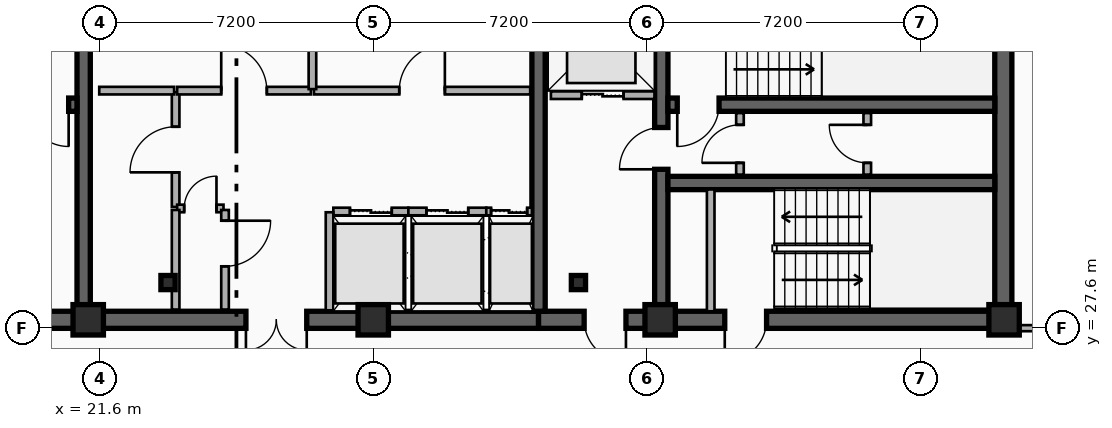
"""IFC4 building model, lengths in metres.
Left out: names, types, materials, properties, quantities, classifications, styles, units other than length and angle.
Written with IfcOpenShell. Run it as: python <this file> out.ifc"""

import sys

from ifc_helpers import new_model, si_unit, direction, frame, frame_2d, origin, origin_2d, place, context, subcontext, project, spatial, rectangle, i_section, extrude, element, fill, save


model = new_model("IFC4")
c1 = context("Model", 3, precision=1e-05, world=origin(), true_north=direction((0.0, 1.0)))
c2 = subcontext(c1, "Body", "Model", "MODEL_VIEW")
j1 = project(units=[si_unit("LENGTHUNIT", "METRE"), si_unit("PLANEANGLEUNIT", "RADIAN")], contexts=[c1])
p1 = place(None, origin())
s1 = spatial("IfcSite", under=j1, at=p1, CompositionType="ELEMENT")
p2 = place(p1, origin())
s2 = spatial("IfcBuilding", under=s1, at=p2, CompositionType="ELEMENT")
p3 = place(p2, frame((0.0, 0.0, 273.2)))
s3 = spatial("IfcBuildingStorey", under=s2, at=p3, CompositionType="ELEMENT", Elevation=273.2)
p4 = place(p3, frame((21.18, 27.82, 0.0), z_axis=(0.0, 0.0, 1.0), x_axis=(-1.0, 0.0, 0.0)))
e1 = element("IfcWall", 1, at=p4, inside=s3, PredefinedType="SHEAR", context=c2, shape_type="SweptSolid", body=[
    extrude(rectangle(XDim=9.03, YDim=0.45, at=frame_2d((4.515, 0.0))), origin(), (0.0, 0.0, 1.0), 3.7),
])
p5 = place(p4, frame((2.68, 0.0, 0.0)))
e2 = element("IfcOpeningElement", 2, at=p5, cuts=e1, PredefinedType="OPENING", context=c2, shape_type="SweptSolid", body=[
    extrude(rectangle(XDim=1.1, YDim=2.15, at=frame_2d((0.55, 1.075))), frame((0.0, 0.235, 0.0), z_axis=(0.0, -1.0, 0.0), x_axis=(1.0, 0.0, 0.0)), (0.0, 0.0, 1.0), 0.47),
])
p6 = place(p3, frame((33.15, 27.82, 0.0), z_axis=(0.0, 0.0, 1.0), x_axis=(-1.0, 0.0, 0.0)))
e3 = element("IfcWall", 3, at=p6, inside=s3, PredefinedType="SHEAR", context=c2, shape_type="SweptSolid", body=[
    extrude(rectangle(XDim=11.97, YDim=0.45, at=frame_2d((5.985, 0.0))), origin(), (0.0, 0.0, 1.0), 3.7),
])
p7 = place(p6, frame((6.1, 0.0, 0.0)))
e4 = element("IfcOpeningElement", 4, at=p7, cuts=e3, PredefinedType="OPENING", context=c2, shape_type="SweptSolid", body=[
    extrude(rectangle(XDim=1.6, YDim=2.2, at=frame_2d((0.8, 1.1))), frame((0.0, 0.235, 0.0), z_axis=(0.0, -1.0, 0.0), x_axis=(1.0, 0.0, 0.0)), (0.0, 0.0, 1.0), 0.47),
])
p8 = place(p3, frame((45.38, 27.82, 0.0), z_axis=(0.0, 0.0, 1.0), x_axis=(-1.0, 0.0, 0.0)))
e5 = element("IfcWall", 5, at=p8, inside=s3, PredefinedType="SHEAR", context=c2, shape_type="SweptSolid", body=[
    extrude(rectangle(XDim=12.23, YDim=0.45, at=frame_2d((6.115, 0.0))), origin(), (0.0, 0.0, 1.0), 3.7),
])
p9 = place(p8, frame((9.93, 0.0, 0.0)))
e6 = element("IfcOpeningElement", 6, at=p9, cuts=e5, PredefinedType="OPENING", context=c2, shape_type="SweptSolid", body=[
    extrude(rectangle(XDim=1.1, YDim=2.15, at=frame_2d((0.55, 1.075))), frame((0.0, 0.235, 0.0), z_axis=(0.0, -1.0, 0.0), x_axis=(1.0, 0.0, 0.0)), (0.0, 0.0, 1.0), 0.47),
])
p10 = place(p8, frame((6.23, 0.0, 0.0)))
e7 = element("IfcOpeningElement", 7, at=p10, cuts=e5, PredefinedType="OPENING", context=c2, shape_type="SweptSolid", body=[
    extrude(rectangle(XDim=1.1, YDim=2.15, at=frame_2d((0.55, 1.075))), frame((0.0, 0.235, 0.0), z_axis=(0.0, -1.0, 0.0), x_axis=(1.0, 0.0, 0.0)), (0.0, 0.0, 1.0), 0.47),
])
p11 = place(p3, frame((45.38, 28.045, 0.0), z_axis=(0.0, 0.0, 1.0), x_axis=(0.0, 1.0, 0.0)))
e8 = element("IfcWall", 8, at=p11, inside=s3, PredefinedType="SHEAR", context=c2, shape_type="SweptSolid", body=[
    extrude(rectangle(XDim=8.78, YDim=0.45, at=frame_2d((4.39, 0.0))), origin(), (0.0, 0.0, 1.0), 3.7),
])
for number, where, z_axis, x_axis in (
    (9, (21.18, 28.045, 0.0), (0.0, 0.0, 1.0), (0.0, 1.0, 0.0)),
    (10, (33.15, 28.045, 0.0), (0.0, 0.0, 1.0), (0.0, 1.0, 0.0)),
):
    element("IfcWall", number, at=place(p3, frame(where, z_axis=z_axis, x_axis=x_axis)), inside=s3, PredefinedType="SHEAR", context=c2, shape_type="SweptSolid", body=[
        extrude(rectangle(XDim=8.78, YDim=0.35, at=frame_2d((4.39, 0.0))), origin(), (0.0, 0.0, 1.0), 3.7),
    ])
p12 = place(p3, frame((36.38, 28.045, 0.0), z_axis=(0.0, 0.0, 1.0), x_axis=(0.0, 1.0, 0.0)))
e11 = element("IfcWall", 11, at=p12, inside=s3, PredefinedType="SHEAR", context=c2, shape_type="SweptSolid", body=[
    extrude(rectangle(XDim=8.78, YDim=0.35, at=frame_2d((4.39, 0.0))), origin(), (0.0, 0.0, 1.0), 3.7),
])
p13 = place(p12, frame((3.735, 0.0, 0.0)))
e12 = element("IfcOpeningElement", 12, at=p13, cuts=e11, PredefinedType="OPENING", context=c2, shape_type="SweptSolid", body=[
    extrude(rectangle(XDim=1.1, YDim=2.15, at=frame_2d((0.55, 1.075))), frame((0.0, 0.185, 0.0), z_axis=(0.0, -1.0, 0.0), x_axis=(1.0, 0.0, 0.0)), (0.0, 0.0, 1.0), 0.37),
])
p14 = place(p3, frame((21.005, 33.48, 0.0), z_axis=(0.0, 0.0, 1.0), x_axis=(-1.0, 0.0, 0.0)))
e13 = element("IfcWall", 13, at=p14, inside=s3, PredefinedType="SHEAR", context=c2, shape_type="SweptSolid", body=[
    extrude(rectangle(XDim=8.63, YDim=0.35, at=frame_2d((4.315, 0.0))), origin(), (0.0, 0.0, 1.0), 3.7),
])
p15 = place(p14, frame((0.22, 0.0, 0.0)))
e14 = element("IfcOpeningElement", 14, at=p15, cuts=e13, PredefinedType="OPENING", context=c2, shape_type="SweptSolid", body=[
    extrude(rectangle(XDim=1.1, YDim=2.15, at=frame_2d((0.55, 1.075))), frame((0.0, 0.185, 0.0), z_axis=(0.0, -1.0, 0.0), x_axis=(1.0, 0.0, 0.0)), (0.0, 0.0, 1.0), 0.37),
])
p16 = place(p3, frame((45.155, 33.48, 0.0), z_axis=(0.0, 0.0, 1.0), x_axis=(-1.0, 0.0, 0.0)))
e15 = element("IfcWall", 15, at=p16, inside=s3, PredefinedType="SHEAR", context=c2, shape_type="SweptSolid", body=[
    extrude(rectangle(XDim=8.6, YDim=0.35, at=frame_2d((4.3, 0.0))), origin(), (0.0, 0.0, 1.0), 3.7),
])
p17 = place(p16, frame((7.255, 0.0, 0.0)))
e16 = element("IfcOpeningElement", 16, at=p17, cuts=e15, PredefinedType="OPENING", context=c2, shape_type="SweptSolid", body=[
    extrude(rectangle(XDim=1.1, YDim=2.15, at=frame_2d((0.55, 1.075))), frame((0.0, 0.185, 0.0), z_axis=(0.0, -1.0, 0.0), x_axis=(1.0, 0.0, 0.0)), (0.0, 0.0, 1.0), 0.37),
])
p18 = place(p3, frame((36.555, 31.42, 0.0), z_axis=(0.0, 0.0, 1.0), x_axis=(1.0, 0.0, 0.0)))
e17 = element("IfcWall", 17, at=p18, inside=s3, PredefinedType="SHEAR", context=c2, shape_type="SweptSolid", body=[
    extrude(rectangle(XDim=8.6, YDim=0.35, at=frame_2d((4.3, 0.0))), origin(), (0.0, 0.0, 1.0), 3.7),
])
for number, where, z_axis, x_axis in (
    (18, (23.4, 28.8, 0.0), (0.0, 0.0, 1.0), (1.0, 0.0, 0.0)),
    (19, (34.2, 28.8, 0.0), (0.0, 0.0, 1.0), (1.0, 0.0, 0.0)),
):
    element("IfcColumn", number, at=place(p3, frame(where, z_axis=z_axis, x_axis=x_axis)), inside=s3, PredefinedType="COLUMN", context=c2, shape_type="SweptSolid", body=[
        extrude(i_section(OverallWidth=0.374, OverallDepth=0.372, WebThickness=0.017, FlangeThickness=0.027, FilletRadius=0.015, at=origin_2d()), origin(), (0.0, 0.0, 1.0), 3.7),
    ])
for number, where, z_axis, x_axis in (
    (20, (21.3, 27.82, 0.0), (0.0, 0.0, 1.0), (1.0, 0.0, 0.0)),
    (21, (28.8, 27.82, 0.0), (0.0, 0.0, 1.0), (1.0, 0.0, 0.0)),
    (22, (36.35, 27.82, 0.0), (0.0, 0.0, 1.0), (1.0, 0.0, 0.0)),
    (23, (45.4, 27.82, 0.0), (0.0, 0.0, 1.0), (1.0, 0.0, 0.0)),
):
    element("IfcColumn", number, at=place(p3, frame(where, z_axis=z_axis, x_axis=x_axis)), inside=s3, PredefinedType="COLUMN", context=c2, shape_type="SweptSolid", body=[
        extrude(rectangle(XDim=0.8, YDim=0.8, at=origin_2d()), origin(), (0.0, 0.0, 1.0), 3.7),
    ])
p19 = place(p3, frame((33.475, 33.73, 0.0), z_axis=(0.0, 0.0, 1.0), x_axis=(1.0, 0.0, 0.0)))
e24 = element("IfcWall", 24, at=p19, inside=s3, PredefinedType="PARTITIONING", context=c2, shape_type="SweptSolid", body=[
    extrude(rectangle(XDim=2.725, YDim=0.2, at=frame_2d((1.362, 0.0))), origin(), (0.0, 0.0, 1.0), 2.49),
])
p20 = place(p19, frame((0.812, 0.0, 0.0)))
e25 = element("IfcOpeningElement", 25, at=p20, cuts=e24, PredefinedType="OPENING", context=c2, shape_type="SweptSolid", body=[
    extrude(rectangle(XDim=1.1, YDim=2.15, at=frame_2d((0.55, 1.075))), frame((0.0, 0.11, 0.0), z_axis=(0.0, -1.0, 0.0), x_axis=(1.0, 0.0, 0.0)), (0.0, 0.0, 1.0), 0.22),
])
p21 = place(p3, frame((27.75, 30.67, 0.0), z_axis=(0.0, 0.0, 1.0), x_axis=(1.0, 0.0, 0.0)))
e26 = element("IfcWall", 26, at=p21, inside=s3, PredefinedType="PARTITIONING", context=c2, shape_type="SweptSolid", body=[
    extrude(rectangle(XDim=1.975, YDim=0.2, at=frame_2d((0.988, 0.0))), origin(), (0.0, 0.0, 1.0), 2.49),
])
p22 = place(p21, frame((0.438, 0.0, 0.0)))
e27 = element("IfcOpeningElement", 27, at=p22, cuts=e26, PredefinedType="OPENING", context=c2, shape_type="SweptSolid", body=[
    extrude(rectangle(XDim=1.1, YDim=2.15, at=frame_2d((0.55, 1.075))), frame((0.0, 0.11, 0.0), z_axis=(0.0, -1.0, 0.0), x_axis=(1.0, 0.0, 0.0)), (0.0, 0.0, 1.0), 0.22),
])
p23 = place(p3, frame((27.65, 28.07, 0.0), z_axis=(0.0, 0.0, 1.0), x_axis=(0.0, 1.0, 0.0)))
e28 = element("IfcWall", 28, at=p23, inside=s3, PredefinedType="PARTITIONING", context=c2, shape_type="SweptSolid", body=[
    extrude(rectangle(XDim=2.58, YDim=0.2, at=frame_2d((1.29, 0.0))), origin(), (0.0, 0.0, 1.0), 2.49),
])
p24 = place(p3, frame((29.725, 30.67, 0.0), z_axis=(0.0, 0.0, 1.0), x_axis=(1.0, 0.0, 0.0)))
e29 = element("IfcWall", 29, at=p24, inside=s3, PredefinedType="PARTITIONING", context=c2, shape_type="SweptSolid", body=[
    extrude(rectangle(XDim=2.05, YDim=0.2, at=frame_2d((1.025, 0.0))), origin(), (0.0, 0.0, 1.0), 2.8),
])
p25 = place(p24, frame((0.475, 0.0, 0.0)))
e30 = element("IfcOpeningElement", 30, at=p25, cuts=e29, PredefinedType="OPENING", context=c2, shape_type="SweptSolid", body=[
    extrude(rectangle(XDim=1.1, YDim=2.15, at=frame_2d((0.55, 1.075))), frame((0.0, 0.11, 0.0), z_axis=(0.0, -1.0, 0.0), x_axis=(1.0, 0.0, 0.0)), (0.0, 0.0, 1.0), 0.22),
])
p26 = place(p3, frame((31.775, 30.67, 0.0), z_axis=(0.0, 0.0, 1.0), x_axis=(1.0, 0.0, 0.0)))
e31 = element("IfcWall", 31, at=p26, inside=s3, PredefinedType="PARTITIONING", context=c2, shape_type="SweptSolid", body=[
    extrude(rectangle(XDim=1.2, YDim=0.2, at=frame_2d((0.6, 0.0))), origin(), (0.0, 0.0, 1.0), 2.8),
])
p27 = place(p26, frame((0.125, 0.0, 0.0)))
e32 = element("IfcOpeningElement", 32, at=p27, cuts=e31, PredefinedType="OPENING", context=c2, shape_type="SweptSolid", body=[
    extrude(rectangle(XDim=0.95, YDim=2.15, at=frame_2d((0.475, 1.075))), frame((0.0, 0.11, 0.0), z_axis=(0.0, -1.0, 0.0), x_axis=(1.0, 0.0, 0.0)), (0.0, 0.0, 1.0), 0.22),
])
p28 = place(p3, frame((37.68, 28.045, 0.0), z_axis=(0.0, 0.0, 1.0), x_axis=(0.0, 1.0, 0.0)))
e33 = element("IfcWall", 33, at=p28, inside=s3, PredefinedType="PARTITIONING", context=c2, shape_type="SweptSolid", body=[
    extrude(rectangle(XDim=3.205, YDim=0.2, at=frame_2d((1.603, 0.0))), origin(), (0.0, 0.0, 1.0), 2.8),
])
p29 = place(p3, frame((38.45, 31.64, 0.0), z_axis=(0.0, 0.0, 1.0), x_axis=(0.0, 1.0, 0.0)))
e34 = element("IfcWall", 34, at=p29, inside=s3, PredefinedType="PARTITIONING", context=c2, shape_type="SweptSolid", body=[
    extrude(rectangle(XDim=1.62, YDim=0.2, at=frame_2d((0.81, 0.0))), origin(), (0.0, 0.0, 1.0), 3.42),
])
p30 = place(p29, frame((0.31, 0.0, 0.0)))
e35 = element("IfcOpeningElement", 35, at=p30, cuts=e34, PredefinedType="OPENING", context=c2, shape_type="SweptSolid", body=[
    extrude(rectangle(XDim=1.0, YDim=2.15, at=frame_2d((0.5, 1.075))), frame((0.0, 0.11, 0.0), z_axis=(0.0, -1.0, 0.0), x_axis=(1.0, 0.0, 0.0)), (0.0, 0.0, 1.0), 0.22),
])
p31 = place(p3, frame((41.8, 31.64, 0.0), z_axis=(0.0, 0.0, 1.0), x_axis=(0.0, 1.0, 0.0)))
e36 = element("IfcWall", 36, at=p31, inside=s3, PredefinedType="PARTITIONING", context=c2, shape_type="SweptSolid", body=[
    extrude(rectangle(XDim=1.62, YDim=0.2, at=frame_2d((0.81, 0.0))), origin(), (0.0, 0.0, 1.0), 3.42),
])
p32 = place(p31, frame((0.31, 0.0, 0.0)))
e37 = element("IfcOpeningElement", 37, at=p32, cuts=e36, PredefinedType="OPENING", context=c2, shape_type="SweptSolid", body=[
    extrude(rectangle(XDim=1.0, YDim=2.15, at=frame_2d((0.5, 1.075))), frame((0.0, 0.11, 0.0), z_axis=(0.0, -1.0, 0.0), x_axis=(1.0, 0.0, 0.0)), (0.0, 0.0, 1.0), 0.22),
])
p33 = place(p3, frame((23.6, 30.79, 0.0), z_axis=(0.0, 0.0, 1.0), x_axis=(0.0, 1.0, 0.0)))
e38 = element("IfcWall", 38, at=p33, inside=s3, PredefinedType="PARTITIONING", context=c2, shape_type="SweptSolid", body=[
    extrude(rectangle(XDim=3.02, YDim=0.2, at=frame_2d((1.51, 0.0))), origin(), (0.0, 0.0, 1.0), 3.42),
])
p34 = place(p33, frame((0.91, 0.0, 0.0)))
e39 = element("IfcOpeningElement", 39, at=p34, cuts=e38, PredefinedType="OPENING", context=c2, shape_type="SweptSolid", body=[
    extrude(rectangle(XDim=1.2, YDim=2.15, at=frame_2d((0.6, 1.075))), frame((0.0, 0.11, 0.0), z_axis=(0.0, -1.0, 0.0), x_axis=(1.0, 0.0, 0.0)), (0.0, 0.0, 1.0), 0.22),
])
p35 = place(p3, frame((23.64, 30.75, 0.0), z_axis=(0.0, 0.0, 1.0), x_axis=(1.0, 0.0, 0.0)))
e40 = element("IfcWall", 40, at=p35, inside=s3, PredefinedType="PARTITIONING", context=c2, shape_type="SweptSolid", body=[
    extrude(rectangle(XDim=1.22, YDim=0.2, at=frame_2d((0.61, 0.0))), origin(), (0.0, 0.0, 1.0), 3.42),
])
p36 = place(p35, frame((0.185, 0.0, 0.0)))
e41 = element("IfcOpeningElement", 41, at=p36, cuts=e40, PredefinedType="OPENING", context=c2, shape_type="SweptSolid", body=[
    extrude(rectangle(XDim=0.85, YDim=2.1, at=frame_2d((0.425, 1.05))), frame((0.0, 0.11, 0.0), z_axis=(0.0, -1.0, 0.0), x_axis=(1.0, 0.0, 0.0)), (0.0, 0.0, 1.0), 0.22),
])
p37 = place(p3, frame((23.64, 33.85, 0.0), z_axis=(0.0, 0.0, 1.0), x_axis=(1.0, 0.0, 0.0)))
e42 = element("IfcWall", 42, at=p37, inside=s3, PredefinedType="PARTITIONING", context=c2, shape_type="SweptSolid", body=[
    extrude(rectangle(XDim=3.52, YDim=0.2, at=frame_2d((1.76, 0.0))), origin(), (0.0, 0.0, 1.0), 3.42),
])
p38 = place(p37, frame((1.16, 0.0, 0.0)))
e43 = element("IfcOpeningElement", 43, at=p38, cuts=e42, PredefinedType="OPENING", context=c2, shape_type="SweptSolid", body=[
    extrude(rectangle(XDim=1.2, YDim=2.15, at=frame_2d((0.6, 1.075))), frame((0.0, 0.11, 0.0), z_axis=(0.0, -1.0, 0.0), x_axis=(1.0, 0.0, 0.0)), (0.0, 0.0, 1.0), 0.22),
])
p39 = place(p3, frame((27.24, 33.85, 0.0), z_axis=(0.0, 0.0, 1.0), x_axis=(1.0, 0.0, 0.0)))
e44 = element("IfcWall", 44, at=p39, inside=s3, PredefinedType="PARTITIONING", context=c2, shape_type="SweptSolid", body=[
    extrude(rectangle(XDim=5.69, YDim=0.2, at=frame_2d((2.845, 0.0))), origin(), (0.0, 0.0, 1.0), 2.49),
])
p40 = place(p39, frame((2.245, 0.0, 0.0)))
e45 = element("IfcOpeningElement", 45, at=p40, cuts=e44, PredefinedType="OPENING", context=c2, shape_type="SweptSolid", body=[
    extrude(rectangle(XDim=1.2, YDim=2.15, at=frame_2d((0.6, 1.075))), frame((0.0, 0.11, 0.0), z_axis=(0.0, -1.0, 0.0), x_axis=(1.0, 0.0, 0.0)), (0.0, 0.0, 1.0), 0.22),
])
p41 = place(p3, frame((24.9, 30.71, 0.0), z_axis=(0.0, 0.0, 1.0), x_axis=(0.0, -1.0, 0.0)))
e46 = element("IfcWall", 46, at=p41, inside=s3, PredefinedType="PARTITIONING", context=c2, shape_type="SweptSolid", body=[
    extrude(rectangle(XDim=2.62, YDim=0.2, at=frame_2d((1.31, 0.0))), origin(), (0.0, 0.0, 1.0), 2.8),
])
p42 = place(p41, frame((0.282, 0.0, 0.0)))
e47 = element("IfcOpeningElement", 47, at=p42, cuts=e46, PredefinedType="OPENING", context=c2, shape_type="SweptSolid", body=[
    extrude(rectangle(XDim=1.2, YDim=2.15, at=frame_2d((0.6, 1.075))), frame((0.0, 0.11, 0.0), z_axis=(0.0, -1.0, 0.0), x_axis=(1.0, 0.0, 0.0)), (0.0, 0.0, 1.0), 0.22),
])
p43 = place(p3, frame((23.6, 28.09, 0.0), z_axis=(0.0, 0.0, 1.0), x_axis=(0.0, 1.0, 0.0)))
e48 = element("IfcWall", 48, at=p43, inside=s3, PredefinedType="PARTITIONING", context=c2, shape_type="SweptSolid", body=[
    extrude(rectangle(XDim=2.62, YDim=0.2, at=frame_2d((1.31, 0.0))), origin(), (0.0, 0.0, 1.0), 2.8),
])
p44 = place(p3, frame((21.59, 33.85, 0.0), z_axis=(0.0, 0.0, 1.0), x_axis=(1.0, 0.0, 0.0)))
e49 = element("IfcWall", 49, at=p44, inside=s3, PredefinedType="PARTITIONING", context=c2, shape_type="SweptSolid", body=[
    extrude(rectangle(XDim=1.97, YDim=0.2, at=frame_2d((0.985, 0.0))), origin(), (0.0, 0.0, 1.0), 2.49),
])
p45 = place(p3, frame((27.2, 33.89, 0.0), z_axis=(0.0, 0.0, 1.0), x_axis=(0.0, 1.0, 0.0)))
e50 = element("IfcWall", 50, at=p45, inside=s3, PredefinedType="PARTITIONING", context=c2, shape_type="SweptSolid", body=[
    extrude(rectangle(XDim=2.72, YDim=0.2, at=frame_2d((1.36, 0.0))), origin(), (0.0, 0.0, 1.0), 3.42),
])
p46 = place(p3, frame((45.41, 27.6, 0.0), z_axis=(0.0, 0.0, 1.0), x_axis=(1.0, 0.0, 0.0)))
e51 = element("IfcWall", 51, at=p46, inside=s3, PredefinedType="PARTITIONING", context=c2, shape_type="SweptSolid", body=[
    extrude(rectangle(XDim=0.91, YDim=0.16, at=frame_2d((0.455, 0.0))), origin(), (0.0, 0.0, 1.0), 2.49),
])
p47 = place(p20, origin())
e52 = element("IfcDoor", 52, at=p47, inside=s3, OperationType="DOUBLE_DOOR_SLIDING", PredefinedType="DOOR", context=c2, shape_type="SweptSolid", body=[
    extrude(rectangle(XDim=1.1, YDim=2.15, at=frame_2d((0.55, 1.075))), frame((0.0, 0.025, 0.0), z_axis=(0.0, -1.0, 0.0), x_axis=(1.0, 0.0, 0.0)), (0.0, 0.0, 1.0), 0.05),
])
fill(e25, e52)
p48 = place(p22, origin())
e53 = element("IfcDoor", 53, at=p48, inside=s3, OperationType="DOUBLE_DOOR_SLIDING", PredefinedType="DOOR", context=c2, shape_type="SweptSolid", body=[
    extrude(rectangle(XDim=1.1, YDim=2.15, at=frame_2d((0.55, 1.075))), frame((0.0, 0.025, 0.0), z_axis=(0.0, -1.0, 0.0), x_axis=(1.0, 0.0, 0.0)), (0.0, 0.0, 1.0), 0.05),
])
fill(e27, e53)
p49 = place(p25, origin())
e54 = element("IfcDoor", 54, at=p49, inside=s3, OperationType="DOUBLE_DOOR_SLIDING", PredefinedType="DOOR", context=c2, shape_type="SweptSolid", body=[
    extrude(rectangle(XDim=1.1, YDim=2.15, at=frame_2d((0.55, 1.075))), frame((0.0, 0.025, 0.0), z_axis=(0.0, -1.0, 0.0), x_axis=(1.0, 0.0, 0.0)), (0.0, 0.0, 1.0), 0.05),
])
fill(e30, e54)
p50 = place(p27, origin())
e55 = element("IfcDoor", 55, at=p50, inside=s3, OperationType="DOUBLE_DOOR_SLIDING", PredefinedType="DOOR", context=c2, shape_type="SweptSolid", body=[
    extrude(rectangle(XDim=0.95, YDim=2.15, at=frame_2d((0.475, 1.075))), frame((0.0, 0.025, 0.0), z_axis=(0.0, -1.0, 0.0), x_axis=(1.0, 0.0, 0.0)), (0.0, 0.0, 1.0), 0.05),
])
fill(e32, e55)
p51 = place(p15, origin())
e56 = element("IfcDoor", 56, at=p51, inside=s3, OperationType="SINGLE_SWING_LEFT", PredefinedType="DOOR", context=c2, shape_type="SweptSolid", body=[
    extrude(rectangle(XDim=1.1, YDim=2.15, at=frame_2d((0.55, 1.075))), frame((0.0, 0.025, 0.0), z_axis=(0.0, -1.0, 0.0), x_axis=(1.0, 0.0, 0.0)), (0.0, 0.0, 1.0), 0.05),
])
fill(e14, e56)
p52 = place(p17, origin())
e57 = element("IfcDoor", 57, at=p52, inside=s3, OperationType="SINGLE_SWING_RIGHT", PredefinedType="DOOR", context=c2, shape_type="SweptSolid", body=[
    extrude(rectangle(XDim=1.1, YDim=2.15, at=frame_2d((0.55, 1.075))), frame((0.0, 0.025, 0.0), z_axis=(0.0, -1.0, 0.0), x_axis=(1.0, 0.0, 0.0)), (0.0, 0.0, 1.0), 0.05),
])
fill(e16, e57)
p53 = place(p13, origin())
e58 = element("IfcDoor", 58, at=p53, inside=s3, OperationType="SINGLE_SWING_LEFT", PredefinedType="DOOR", context=c2, shape_type="SweptSolid", body=[
    extrude(rectangle(XDim=1.1, YDim=2.15, at=frame_2d((0.55, 1.075))), frame((0.0, 0.025, 0.0), z_axis=(0.0, -1.0, 0.0), x_axis=(1.0, 0.0, 0.0)), (0.0, 0.0, 1.0), 0.05),
])
fill(e12, e58)
p54 = place(p9, origin())
e59 = element("IfcDoor", 59, at=p54, inside=s3, OperationType="SINGLE_SWING_LEFT", PredefinedType="DOOR", context=c2, shape_type="SweptSolid", body=[
    extrude(rectangle(XDim=1.1, YDim=2.15, at=frame_2d((0.55, 1.075))), frame((0.0, 0.025, 0.0), z_axis=(0.0, -1.0, 0.0), x_axis=(1.0, 0.0, 0.0)), (0.0, 0.0, 1.0), 0.05),
])
fill(e6, e59)
p55 = place(p10, origin())
e60 = element("IfcDoor", 60, at=p55, inside=s3, OperationType="SINGLE_SWING_RIGHT", PredefinedType="DOOR", context=c2, shape_type="SweptSolid", body=[
    extrude(rectangle(XDim=1.1, YDim=2.15, at=frame_2d((0.55, 1.075))), frame((0.0, 0.025, 0.0), z_axis=(0.0, -1.0, 0.0), x_axis=(1.0, 0.0, 0.0)), (0.0, 0.0, 1.0), 0.05),
])
fill(e7, e60)
p56 = place(p7, origin())
e61 = element("IfcDoor", 61, at=p56, inside=s3, OperationType="SINGLE_SWING_LEFT", PredefinedType="DOOR", context=c2, shape_type="SweptSolid", body=[
    extrude(rectangle(XDim=1.6, YDim=2.2, at=frame_2d((0.8, 1.1))), frame((0.0, 0.025, 0.0), z_axis=(0.0, -1.0, 0.0), x_axis=(1.0, 0.0, 0.0)), (0.0, 0.0, 1.0), 0.05),
])
fill(e4, e61)
p57 = place(p30, origin())
e62 = element("IfcDoor", 62, at=p57, inside=s3, OperationType="SINGLE_SWING_LEFT", PredefinedType="DOOR", context=c2, shape_type="SweptSolid", body=[
    extrude(rectangle(XDim=1.0, YDim=2.15, at=frame_2d((0.5, 1.075))), frame((0.0, 0.025, 0.0), z_axis=(0.0, -1.0, 0.0), x_axis=(1.0, 0.0, 0.0)), (0.0, 0.0, 1.0), 0.05),
])
fill(e35, e62)
p58 = place(p32, origin())
e63 = element("IfcDoor", 63, at=p58, inside=s3, OperationType="SINGLE_SWING_RIGHT", PredefinedType="DOOR", context=c2, shape_type="SweptSolid", body=[
    extrude(rectangle(XDim=1.0, YDim=2.15, at=frame_2d((0.5, 1.075))), frame((0.0, 0.025, 0.0), z_axis=(0.0, -1.0, 0.0), x_axis=(1.0, 0.0, 0.0)), (0.0, 0.0, 1.0), 0.05),
])
fill(e37, e63)
p59 = place(p34, origin())
e64 = element("IfcDoor", 64, at=p59, inside=s3, OperationType="SINGLE_SWING_LEFT", PredefinedType="DOOR", context=c2, shape_type="SweptSolid", body=[
    extrude(rectangle(XDim=1.2, YDim=2.15, at=frame_2d((0.6, 1.075))), frame((0.0, 0.025, 0.0), z_axis=(0.0, -1.0, 0.0), x_axis=(1.0, 0.0, 0.0)), (0.0, 0.0, 1.0), 0.05),
])
fill(e39, e64)
p60 = place(p36, origin())
e65 = element("IfcDoor", 65, at=p60, inside=s3, OperationType="SINGLE_SWING_RIGHT", PredefinedType="DOOR", context=c2, shape_type="SweptSolid", body=[
    extrude(rectangle(XDim=0.85, YDim=2.1, at=frame_2d((0.425, 1.05))), frame((0.0, 0.025, 0.0), z_axis=(0.0, -1.0, 0.0), x_axis=(1.0, 0.0, 0.0)), (0.0, 0.0, 1.0), 0.05),
])
fill(e41, e65)
p61 = place(p38, origin())
e66 = element("IfcDoor", 66, at=p61, inside=s3, OperationType="SINGLE_SWING_LEFT", PredefinedType="DOOR", context=c2, shape_type="SweptSolid", body=[
    extrude(rectangle(XDim=1.2, YDim=2.15, at=frame_2d((0.6, 1.075))), frame((0.0, 0.025, 0.0), z_axis=(0.0, -1.0, 0.0), x_axis=(1.0, 0.0, 0.0)), (0.0, 0.0, 1.0), 0.05),
])
fill(e43, e66)
p62 = place(p40, origin())
e67 = element("IfcDoor", 67, at=p62, inside=s3, OperationType="SINGLE_SWING_RIGHT", PredefinedType="DOOR", context=c2, shape_type="SweptSolid", body=[
    extrude(rectangle(XDim=1.2, YDim=2.15, at=frame_2d((0.6, 1.075))), frame((0.0, 0.025, 0.0), z_axis=(0.0, -1.0, 0.0), x_axis=(1.0, 0.0, 0.0)), (0.0, 0.0, 1.0), 0.05),
])
fill(e45, e67)
p63 = place(p42, origin())
e68 = element("IfcDoor", 68, at=p63, inside=s3, OperationType="SINGLE_SWING_LEFT", PredefinedType="DOOR", context=c2, shape_type="SweptSolid", body=[
    extrude(rectangle(XDim=1.2, YDim=2.15, at=frame_2d((0.6, 1.075))), frame((0.0, 0.025, 0.0), z_axis=(0.0, -1.0, 0.0), x_axis=(1.0, 0.0, 0.0)), (0.0, 0.0, 1.0), 0.05),
])
fill(e47, e68)
save(model, sys.argv[1])
